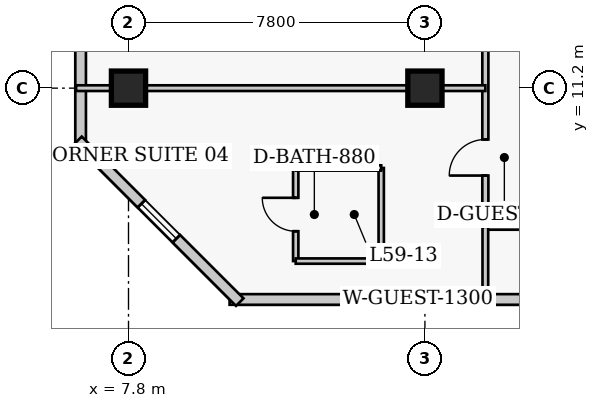
"""IFC4 building model, lengths in metres.
Left out: names, types, materials, properties, quantities, classifications, styles, units other than length and angle.
Written with IfcOpenShell. Run it as: python <this file> out.ifc"""

import sys

from ifc_helpers import new_model, si_unit, direction, frame, frame_2d, origin, origin_2d, place, context, subcontext, project, spatial, rectangle, extrude, element, fill, save


model = new_model("IFC4")
c1 = context("Model", 3, precision=1e-05, world=origin(), true_north=direction((0.0, 1.0)))
c2 = subcontext(c1, "Body", "Model", "MODEL_VIEW")
j1 = project(units=[si_unit("LENGTHUNIT", "METRE"), si_unit("PLANEANGLEUNIT", "RADIAN")], contexts=[c1])
p1 = place(None, origin())
s1 = spatial("IfcSite", under=j1, at=p1, CompositionType="ELEMENT")
p2 = place(p1, origin())
s2 = spatial("IfcBuilding", under=s1, at=p2, CompositionType="ELEMENT")
p3 = place(p2, frame((0.0, 0.0, 236.5)))
s3 = spatial("IfcBuildingStorey", under=s2, at=p3, CompositionType="ELEMENT", Elevation=236.5)
for number, where, z_axis, x_axis in (
    (1, (7.8, 11.2, 0.0), (0.0, 0.0, 1.0), (1.0, 0.0, 0.0)),
    (2, (15.6, 11.2, 0.0), (0.0, 0.0, 1.0), (1.0, 0.0, 0.0)),
):
    element("IfcColumn", number, at=place(p3, frame(where, z_axis=z_axis, x_axis=x_axis)), inside=s3, PredefinedType="COLUMN", context=c2, shape_type="SweptSolid", body=[
        extrude(rectangle(XDim=0.9, YDim=0.9, at=origin_2d()), origin(), (0.0, 0.0, 1.0), 3.9),
    ])
p4 = place(p3, frame((10.46, 5.64, 0.0), z_axis=(0.0, 0.0, 1.0), x_axis=(1.0, 0.0, 0.0)))
e3 = element("IfcWall", 3, at=p4, inside=s3, PredefinedType="SOLIDWALL", context=c2, shape_type="SweptSolid", body=[
    extrude(rectangle(XDim=25.83, YDim=0.28, at=frame_2d((12.915, 0.0))), origin(), (0.0, 0.0, 1.0), 3.52),
])
p5 = place(p4, frame((16.14, 0.0, 0.0)))
e4 = element("IfcOpeningElement", 4, at=p5, cuts=e3, PredefinedType="OPENING", context=c2, shape_type="SweptSolid", body=[
    extrude(rectangle(XDim=1.4, YDim=2.15, at=frame_2d((0.7, 1.075))), frame((0.0, 0.15, 0.0), z_axis=(0.0, -1.0, 0.0), x_axis=(1.0, 0.0, 0.0)), (0.0, 0.0, 1.0), 0.3),
])
p6 = place(p4, frame((4.305, 0.0, 0.85)))
e5 = element("IfcOpeningElement", 5, at=p6, cuts=e3, PredefinedType="OPENING", context=c2, shape_type="SweptSolid", body=[
    extrude(rectangle(XDim=1.3, YDim=1.7, at=frame_2d((0.65, 0.85))), frame((0.0, 0.15, 0.0), z_axis=(0.0, -1.0, 0.0), x_axis=(1.0, 0.0, 0.0)), (0.0, 0.0, 1.0), 0.3),
])
p7 = place(p4, frame((11.615, 0.0, 0.85)))
e6 = element("IfcOpeningElement", 6, at=p7, cuts=e3, PredefinedType="OPENING", context=c2, shape_type="SweptSolid", body=[
    extrude(rectangle(XDim=1.3, YDim=1.7, at=frame_2d((0.65, 0.85))), frame((0.0, 0.15, 0.0), z_axis=(0.0, -1.0, 0.0), x_axis=(1.0, 0.0, 0.0)), (0.0, 0.0, 1.0), 0.3),
])
p8 = place(p4, frame((20.875, 0.0, 0.85)))
e7 = element("IfcOpeningElement", 7, at=p8, cuts=e3, PredefinedType="OPENING", context=c2, shape_type="SweptSolid", body=[
    extrude(rectangle(XDim=1.3, YDim=1.7, at=frame_2d((0.65, 0.85))), frame((0.0, 0.15, 0.0), z_axis=(0.0, -1.0, 0.0), x_axis=(1.0, 0.0, 0.0)), (0.0, 0.0, 1.0), 0.3),
])
p9 = place(p3, frame((6.54, 39.44, 0.0), z_axis=(0.0, 0.0, 1.0), x_axis=(0.0, -1.0, 0.0)))
e8 = element("IfcWall", 8, at=p9, inside=s3, PredefinedType="SOLIDWALL", context=c2, shape_type="SweptSolid", body=[
    extrude(rectangle(XDim=29.88, YDim=0.28, at=frame_2d((14.94, 0.0))), origin(), (0.0, 0.0, 1.0), 3.52),
])
p10 = place(p9, frame((3.735, 0.0, 0.85)))
e9 = element("IfcOpeningElement", 9, at=p10, cuts=e8, PredefinedType="OPENING", context=c2, shape_type="SweptSolid", body=[
    extrude(rectangle(XDim=1.3, YDim=1.7, at=frame_2d((0.65, 0.85))), frame((0.0, 0.15, 0.0), z_axis=(0.0, -1.0, 0.0), x_axis=(1.0, 0.0, 0.0)), (0.0, 0.0, 1.0), 0.3),
])
p11 = place(p9, frame((11.205, 0.0, 0.85)))
e10 = element("IfcOpeningElement", 10, at=p11, cuts=e8, PredefinedType="OPENING", context=c2, shape_type="SweptSolid", body=[
    extrude(rectangle(XDim=1.3, YDim=1.7, at=frame_2d((0.65, 0.85))), frame((0.0, 0.15, 0.0), z_axis=(0.0, -1.0, 0.0), x_axis=(1.0, 0.0, 0.0)), (0.0, 0.0, 1.0), 0.3),
])
p12 = place(p9, frame((17.375, 0.0, 0.85)))
e11 = element("IfcOpeningElement", 11, at=p12, cuts=e8, PredefinedType="OPENING", context=c2, shape_type="SweptSolid", body=[
    extrude(rectangle(XDim=1.3, YDim=1.7, at=frame_2d((0.65, 0.85))), frame((0.0, 0.15, 0.0), z_axis=(0.0, -1.0, 0.0), x_axis=(1.0, 0.0, 0.0)), (0.0, 0.0, 1.0), 0.3),
])
p13 = place(p9, frame((25.495, 0.0, 0.85)))
e12 = element("IfcOpeningElement", 12, at=p13, cuts=e8, PredefinedType="OPENING", context=c2, shape_type="SweptSolid", body=[
    extrude(rectangle(XDim=1.3, YDim=1.7, at=frame_2d((0.65, 0.85))), frame((0.0, 0.15, 0.0), z_axis=(0.0, -1.0, 0.0), x_axis=(1.0, 0.0, 0.0)), (0.0, 0.0, 1.0), 0.3),
])
p14 = place(p3, frame((6.471, 9.827, 0.0), z_axis=(0.0, 0.0, 1.0), x_axis=(0.707106781187, -0.707106781187, 0.0)))
e13 = element("IfcWall", 13, at=p14, inside=s3, PredefinedType="SOLIDWALL", context=c2, shape_type="SweptSolid", body=[
    extrude(rectangle(XDim=6.02, YDim=0.28, at=frame_2d((3.01, 0.0))), origin(), (0.0, 0.0, 1.0), 3.52),
])
p15 = place(p14, frame((2.36, 0.0, 0.85)))
e14 = element("IfcOpeningElement", 14, at=p15, cuts=e13, PredefinedType="OPENING", context=c2, shape_type="SweptSolid", body=[
    extrude(rectangle(XDim=1.3, YDim=1.7, at=frame_2d((0.65, 0.85))), frame((0.0, 0.15, 0.0), z_axis=(0.0, -1.0, 0.0), x_axis=(1.0, 0.0, 0.0)), (0.0, 0.0, 1.0), 0.3),
])
p16 = place(p3, frame((17.19, 7.55, 0.0), z_axis=(0.0, 0.0, 1.0), x_axis=(0.0, 1.0, 0.0)))
e15 = element("IfcWall", 15, at=p16, inside=s3, PredefinedType="PARTITIONING", context=c2, shape_type="SweptSolid", body=[
    extrude(rectangle(XDim=33.1, YDim=0.16, at=frame_2d((16.55, 0.0))), origin(), (0.0, 0.0, 1.0), 3.52),
])
p17 = place(p16, frame((1.35, 0.0, 0.0)))
e16 = element("IfcOpeningElement", 16, at=p17, cuts=e15, PredefinedType="OPENING", context=c2, shape_type="SweptSolid", body=[
    extrude(rectangle(XDim=0.95, YDim=2.1, at=frame_2d((0.475, 1.05))), frame((0.0, 0.09, 0.0), z_axis=(0.0, -1.0, 0.0), x_axis=(1.0, 0.0, 0.0)), (0.0, 0.0, 1.0), 0.18),
])
p18 = place(p16, frame((7.575, 0.0, 0.0)))
e17 = element("IfcOpeningElement", 17, at=p18, cuts=e15, PredefinedType="OPENING", context=c2, shape_type="SweptSolid", body=[
    extrude(rectangle(XDim=0.95, YDim=2.1, at=frame_2d((0.475, 1.05))), frame((0.0, 0.09, 0.0), z_axis=(0.0, -1.0, 0.0), x_axis=(1.0, 0.0, 0.0)), (0.0, 0.0, 1.0), 0.18),
])
p19 = place(p16, frame((16.375, 0.0, 0.0)))
e18 = element("IfcOpeningElement", 18, at=p19, cuts=e15, PredefinedType="OPENING", context=c2, shape_type="SweptSolid", body=[
    extrude(rectangle(XDim=0.95, YDim=2.1, at=frame_2d((0.475, 1.05))), frame((0.0, 0.09, 0.0), z_axis=(0.0, -1.0, 0.0), x_axis=(1.0, 0.0, 0.0)), (0.0, 0.0, 1.0), 0.18),
])
p20 = place(p16, frame((24.425, 0.0, 0.0)))
e19 = element("IfcOpeningElement", 19, at=p20, cuts=e15, PredefinedType="OPENING", context=c2, shape_type="SweptSolid", body=[
    extrude(rectangle(XDim=0.95, YDim=2.1, at=frame_2d((0.475, 1.05))), frame((0.0, 0.09, 0.0), z_axis=(0.0, -1.0, 0.0), x_axis=(1.0, 0.0, 0.0)), (0.0, 0.0, 1.0), 0.18),
])
p21 = place(p16, frame((31.66, 0.0, 0.0)))
e20 = element("IfcOpeningElement", 20, at=p21, cuts=e15, PredefinedType="OPENING", context=c2, shape_type="SweptSolid", body=[
    extrude(rectangle(XDim=1.0, YDim=2.15, at=frame_2d((0.5, 1.075))), frame((0.0, 0.09, 0.0), z_axis=(0.0, -1.0, 0.0), x_axis=(1.0, 0.0, 0.0)), (0.0, 0.0, 1.0), 0.18),
])
p22 = place(p3, frame((17.19, 7.55, 0.0), z_axis=(0.0, 0.0, 1.0), x_axis=(1.0, 0.0, 0.0)))
e21 = element("IfcWall", 21, at=p22, inside=s3, PredefinedType="PARTITIONING", context=c2, shape_type="SweptSolid", body=[
    extrude(rectangle(XDim=2.22, YDim=0.15, at=frame_2d((1.11, 0.0))), origin(), (0.0, 0.0, 1.0), 3.52),
])
p23 = place(p3, frame((17.19, 5.52, 0.0), z_axis=(0.0, 0.0, 1.0), x_axis=(0.0, 1.0, 0.0)))
e22 = element("IfcWall", 22, at=p23, inside=s3, PredefinedType="PARTITIONING", context=c2, shape_type="SweptSolid", body=[
    extrude(rectangle(XDim=2.03, YDim=0.15, at=frame_2d((1.015, 0.0))), origin(), (0.0, 0.0, 1.0), 3.52),
])
p24 = place(p3, frame((12.2, 6.65, 0.0), z_axis=(0.0, 0.0, 1.0), x_axis=(0.0, 1.0, 0.0)))
e23 = element("IfcWall", 23, at=p24, inside=s3, PredefinedType="PLUMBINGWALL", context=c2, shape_type="SweptSolid", body=[
    extrude(rectangle(XDim=2.45, YDim=0.14, at=frame_2d((1.225, 0.0))), origin(), (0.0, 0.0, 1.0), 3.52),
])
p25 = place(p24, frame((0.785, 0.0, 0.0)))
e24 = element("IfcOpeningElement", 24, at=p25, cuts=e23, PredefinedType="OPENING", context=c2, shape_type="SweptSolid", body=[
    extrude(rectangle(XDim=0.88, YDim=2.05, at=frame_2d((0.44, 1.025))), frame((0.0, 0.08, 0.0), z_axis=(0.0, -1.0, 0.0), x_axis=(1.0, 0.0, 0.0)), (0.0, 0.0, 1.0), 0.16),
])
p26 = place(p3, frame((14.45, 6.65, 0.0), z_axis=(0.0, 0.0, 1.0), x_axis=(0.0, 1.0, 0.0)))
e25 = element("IfcWall", 25, at=p26, inside=s3, PredefinedType="PLUMBINGWALL", context=c2, shape_type="SweptSolid", body=[
    extrude(rectangle(XDim=2.45, YDim=0.14, at=frame_2d((1.225, 0.0))), origin(), (0.0, 0.0, 1.0), 3.52),
])
for number, where, z_axis, x_axis in (
    (26, (12.2, 6.65, 0.0), (0.0, 0.0, 1.0), (1.0, 0.0, 0.0)),
    (27, (12.2, 9.1, 0.0), (0.0, 0.0, 1.0), (1.0, 0.0, 0.0)),
):
    element("IfcWall", number, at=place(p3, frame(where, z_axis=z_axis, x_axis=x_axis)), inside=s3, PredefinedType="PLUMBINGWALL", context=c2, shape_type="SweptSolid", body=[
        extrude(rectangle(XDim=2.25, YDim=0.14, at=frame_2d((1.125, 0.0))), origin(), (0.0, 0.0, 1.0), 3.52),
    ])
p27 = place(p3, frame((6.42, 11.2, 0.0), z_axis=(0.0, 0.0, 1.0), x_axis=(1.0, 0.0, 0.0)))
e28 = element("IfcWall", 28, at=p27, inside=s3, PredefinedType="PARTITIONING", context=c2, shape_type="SweptSolid", body=[
    extrude(rectangle(XDim=10.77, YDim=0.15, at=frame_2d((5.385, 0.0))), origin(), (0.0, 0.0, 1.0), 2.748),
])
p28 = place(p6, origin())
e29 = element("IfcWindow", 29, at=p28, inside=s3, PartitioningType="SINGLE_PANEL", PredefinedType="WINDOW", context=c2, shape_type="SweptSolid", body=[
    extrude(rectangle(XDim=1.3, YDim=1.7, at=frame_2d((0.65, 0.85))), frame((0.0, 0.03, 0.0), z_axis=(0.0, -1.0, 0.0), x_axis=(1.0, 0.0, 0.0)), (0.0, 0.0, 1.0), 0.06),
])
fill(e5, e29)
p29 = place(p15, origin())
e30 = element("IfcWindow", 30, at=p29, inside=s3, PartitioningType="SINGLE_PANEL", PredefinedType="WINDOW", context=c2, shape_type="SweptSolid", body=[
    extrude(rectangle(XDim=1.3, YDim=1.7, at=frame_2d((0.65, 0.85))), frame((0.0, 0.03, 0.0), z_axis=(0.0, -1.0, 0.0), x_axis=(1.0, 0.0, 0.0)), (0.0, 0.0, 1.0), 0.06),
])
fill(e14, e30)
p30 = place(p25, origin())
e31 = element("IfcDoor", 31, at=p30, inside=s3, OperationType="SINGLE_SWING_RIGHT", PredefinedType="DOOR", context=c2, shape_type="SweptSolid", body=[
    extrude(rectangle(XDim=0.88, YDim=2.05, at=frame_2d((0.44, 1.025))), frame((0.0, 0.025, 0.0), z_axis=(0.0, -1.0, 0.0), x_axis=(1.0, 0.0, 0.0)), (0.0, 0.0, 1.0), 0.05),
])
fill(e24, e31)
p31 = place(p17, origin())
e32 = element("IfcDoor", 32, at=p31, inside=s3, OperationType="SINGLE_SWING_LEFT", PredefinedType="DOOR", context=c2, shape_type="SweptSolid", body=[
    extrude(rectangle(XDim=0.95, YDim=2.1, at=frame_2d((0.475, 1.05))), frame((0.0, 0.025, 0.0), z_axis=(0.0, -1.0, 0.0), x_axis=(1.0, 0.0, 0.0)), (0.0, 0.0, 1.0), 0.05),
])
fill(e16, e32)
save(model, sys.argv[1])
